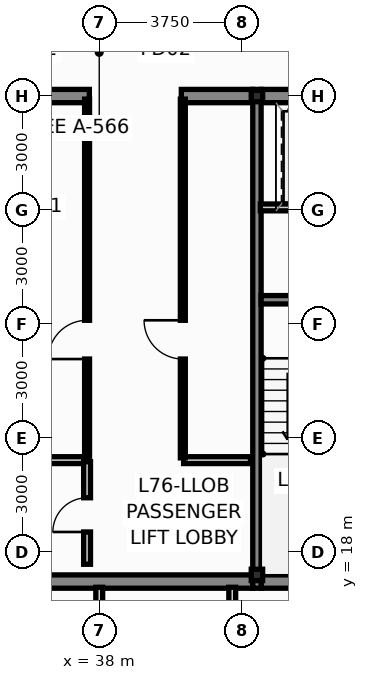
"""IFC4 building model, lengths in metres.
Left out: names, types, materials, properties, quantities, classifications, styles, units other than length and angle.
Written with IfcOpenShell. Run it as: python <this file> out.ifc"""

import sys

from ifc_helpers import new_model, si_unit, direction, frame, frame_2d, origin, origin_2d, place, context, subcontext, project, spatial, rectangle, hollow_rectangle, extrude, source, transform, mapped, element, fill, save


model = new_model("IFC4")
c1 = context("Model", 3, precision=1e-05, world=origin(), true_north=direction((0.0, 1.0)))
c2 = subcontext(c1, "Body", "Model", "MODEL_VIEW")
j1 = project(units=[si_unit("LENGTHUNIT", "METRE"), si_unit("PLANEANGLEUNIT", "RADIAN")], contexts=[c1])
p1 = place(None, origin())
s1 = spatial("IfcSite", under=j1, at=p1, CompositionType="ELEMENT")
p2 = place(p1, origin())
s2 = spatial("IfcBuilding", under=s1, at=p2, CompositionType="ELEMENT")
p3 = place(p2, frame((0.0, 0.0, 289.8)))
s3 = spatial("IfcBuildingStorey", under=s2, at=p3, CompositionType="ELEMENT", Elevation=289.8)
m1 = source(origin(), c2, "Body", "SweptSolid", [
    extrude(hollow_rectangle(XDim=0.3, YDim=0.3, WallThickness=0.012, at=origin_2d()), origin(), (0.0, 0.0, 1.0), 3.4),
])
for number, where, z_axis, x_axis in (
    (1, (42.15, 17.4, 0.0), (0.0, 0.0, 1.0), (1.0, 0.0, 0.0)),
    (2, (42.15, 30.0, 0.0), (0.0, 0.0, 1.0), (1.0, 0.0, 0.0)),
):
    element("IfcColumn", number, at=place(p3, frame(where, z_axis=z_axis, x_axis=x_axis)), inside=s3, PredefinedType="COLUMN", context=c2, shape_type="MappedRepresentation", body=[
        mapped(m1, transform((0.0, 0.0, 0.0), scale=1.0)),
    ])
p4 = place(p3, frame((33.96, 17.225, 0.0), z_axis=(0.0, 0.0, 1.0), x_axis=(1.0, 0.0, 0.0)))
e3 = element("IfcWall", 3, at=p4, inside=s3, PredefinedType="SHEAR", context=c2, shape_type="SweptSolid", body=[
    extrude(rectangle(XDim=8.08, YDim=0.35, at=frame_2d((4.04, 0.0))), origin(), (0.0, 0.0, 1.0), 3.4),
])
p5 = place(p3, frame((42.26, 17.225, 0.0), z_axis=(0.0, 0.0, 1.0), x_axis=(1.0, 0.0, 0.0)))
e4 = element("IfcWall", 4, at=p5, inside=s3, PredefinedType="SHEAR", context=c2, shape_type="SweptSolid", body=[
    extrude(rectangle(XDim=2.9, YDim=0.35, at=frame_2d((1.45, 0.0))), origin(), (0.0, 0.0, 1.0), 3.4),
])
p6 = place(p3, frame((33.96, 30.0, 0.0), z_axis=(0.0, 0.0, 1.0), x_axis=(1.0, 0.0, 0.0)))
e5 = element("IfcWall", 5, at=p6, inside=s3, PredefinedType="SHEAR", context=c2, shape_type="SweptSolid", body=[
    extrude(rectangle(XDim=3.78, YDim=0.35, at=frame_2d((1.89, 0.0))), origin(), (0.0, 0.0, 1.0), 3.4),
])
p7 = place(p3, frame((40.16, 30.0, 0.0), z_axis=(0.0, 0.0, 1.0), x_axis=(1.0, 0.0, 0.0)))
e6 = element("IfcWall", 6, at=p7, inside=s3, PredefinedType="SHEAR", context=c2, shape_type="SweptSolid", body=[
    extrude(rectangle(XDim=1.88, YDim=0.35, at=frame_2d((0.94, 0.0))), origin(), (0.0, 0.0, 1.0), 3.4),
])
p8 = place(p3, frame((42.26, 30.0, 0.0), z_axis=(0.0, 0.0, 1.0), x_axis=(1.0, 0.0, 0.0)))
e7 = element("IfcWall", 7, at=p8, inside=s3, PredefinedType="SHEAR", context=c2, shape_type="SweptSolid", body=[
    extrude(rectangle(XDim=2.9, YDim=0.35, at=frame_2d((1.45, 0.0))), origin(), (0.0, 0.0, 1.0), 3.4),
])
p9 = place(p3, frame((42.15, 17.05, 0.0), z_axis=(0.0, 0.0, 1.0), x_axis=(0.0, 1.0, 0.0)))
e8 = element("IfcWall", 8, at=p9, inside=s3, PredefinedType="SHEAR", context=c2, shape_type="SweptSolid", body=[
    extrude(rectangle(XDim=13.125, YDim=0.22, at=frame_2d((6.562, 0.0))), origin(), (0.0, 0.0, 1.0), 3.4),
])
p10 = place(p3, frame((42.26, 24.64, 0.0), z_axis=(0.0, 0.0, 1.0), x_axis=(1.0, 0.0, 0.0)))
e9 = element("IfcWall", 9, at=p10, inside=s3, PredefinedType="SHEAR", context=c2, shape_type="SweptSolid", body=[
    extrude(rectangle(XDim=2.9, YDim=0.22, at=frame_2d((1.45, 0.0))), origin(), (0.0, 0.0, 1.0), 3.4),
])
p11 = place(p3, frame((42.24, 27.07, 0.0), z_axis=(0.0, 0.0, 1.0), x_axis=(1.0, 0.0, 0.0)))
e10 = element("IfcWall", 10, at=p11, inside=s3, PredefinedType="PARTITIONING", context=c2, shape_type="SweptSolid", body=[
    extrude(rectangle(XDim=2.9, YDim=0.18, at=frame_2d((1.45, 0.0))), origin(), (0.0, 0.0, 1.0), 3.15),
])
p12 = place(p3, frame((34.02, 20.42, 0.0), z_axis=(0.0, 0.0, 1.0), x_axis=(1.0, 0.0, 0.0)))
e11 = element("IfcWall", 11, at=p12, inside=s3, PredefinedType="PARTITIONING", context=c2, shape_type="SweptSolid", body=[
    extrude(rectangle(XDim=3.64, YDim=0.18, at=frame_2d((1.82, 0.0))), origin(), (0.0, 0.0, 1.0), 3.15),
])
p13 = place(p3, frame((40.22, 20.42, 0.0), z_axis=(0.0, 0.0, 1.0), x_axis=(1.0, 0.0, 0.0)))
e12 = element("IfcWall", 12, at=p13, inside=s3, PredefinedType="PARTITIONING", context=c2, shape_type="SweptSolid", body=[
    extrude(rectangle(XDim=1.76, YDim=0.18, at=frame_2d((0.88, 0.0))), origin(), (0.0, 0.0, 1.0), 3.15),
])
p14 = place(p3, frame((37.68, 20.48, 0.0), z_axis=(0.0, 0.0, 1.0), x_axis=(0.0, 1.0, 0.0)))
e13 = element("IfcWall", 13, at=p14, inside=s3, PredefinedType="PARTITIONING", context=c2, shape_type="SweptSolid", body=[
    extrude(rectangle(XDim=9.44, YDim=0.13, at=frame_2d((4.72, 0.0))), origin(), (0.0, 0.0, 1.0), 3.15),
])
p15 = place(p14, frame((2.6, 0.0, 0.0)))
e14 = element("IfcOpeningElement", 14, at=p15, cuts=e13, PredefinedType="OPENING", context=c2, shape_type="SweptSolid", body=[
    extrude(rectangle(XDim=1.02, YDim=2.15, at=frame_2d((0.51, 1.075))), frame((0.0, 0.077, 0.0), z_axis=(0.0, -1.0, 0.0), x_axis=(1.0, 0.0, 0.0)), (0.0, 0.0, 1.0), 0.154),
])
p16 = place(p3, frame((40.2, 20.48, 0.0), z_axis=(0.0, 0.0, 1.0), x_axis=(0.0, 1.0, 0.0)))
e15 = element("IfcWall", 15, at=p16, inside=s3, PredefinedType="PARTITIONING", context=c2, shape_type="SweptSolid", body=[
    extrude(rectangle(XDim=9.44, YDim=0.13, at=frame_2d((4.72, 0.0))), origin(), (0.0, 0.0, 1.0), 3.15),
])
p17 = place(p16, frame((2.6, 0.0, 0.0)))
e16 = element("IfcOpeningElement", 16, at=p17, cuts=e15, PredefinedType="OPENING", context=c2, shape_type="SweptSolid", body=[
    extrude(rectangle(XDim=1.02, YDim=2.15, at=frame_2d((0.51, 1.075))), frame((0.0, 0.077, 0.0), z_axis=(0.0, -1.0, 0.0), x_axis=(1.0, 0.0, 0.0)), (0.0, 0.0, 1.0), 0.154),
])
p18 = place(p3, frame((37.68, 17.68, 0.0), z_axis=(0.0, 0.0, 1.0), x_axis=(0.0, 1.0, 0.0)))
e17 = element("IfcWall", 17, at=p18, inside=s3, PredefinedType="PARTITIONING", context=c2, shape_type="SweptSolid", body=[
    extrude(rectangle(XDim=2.7, YDim=0.18, at=frame_2d((1.35, 0.0))), origin(), (0.0, 0.0, 1.0), 3.15),
])
p19 = place(p18, frame((0.85, 0.0, 0.0)))
e18 = element("IfcOpeningElement", 18, at=p19, cuts=e17, PredefinedType="OPENING", context=c2, shape_type="SweptSolid", body=[
    extrude(rectangle(XDim=0.9, YDim=2.1, at=frame_2d((0.45, 1.05))), frame((0.0, 0.102, 0.0), z_axis=(0.0, -1.0, 0.0), x_axis=(1.0, 0.0, 0.0)), (0.0, 0.0, 1.0), 0.204),
])
p20 = place(p3, frame((38.0, 8.88, 0.0), z_axis=(0.0, 0.0, 1.0), x_axis=(0.0, 1.0, 0.0)))
e19 = element("IfcWall", 19, at=p20, inside=s3, PredefinedType="PARTITIONING", context=c2, shape_type="SweptSolid", body=[
    extrude(rectangle(XDim=8.195, YDim=0.18, at=frame_2d((4.098, 0.0))), origin(), (0.0, 0.0, 1.0), 3.15),
])
p21 = place(p20, frame((3.572, 0.0, 0.0)))
e20 = element("IfcOpeningElement", 20, at=p21, cuts=e19, PredefinedType="OPENING", context=c2, shape_type="SweptSolid", body=[
    extrude(rectangle(XDim=1.05, YDim=2.15, at=frame_2d((0.525, 1.075))), frame((0.0, 0.102, 0.0), z_axis=(0.0, -1.0, 0.0), x_axis=(1.0, 0.0, 0.0)), (0.0, 0.0, 1.0), 0.204),
])
p22 = place(p3, frame((41.5, 8.96, 0.0), z_axis=(0.0, 0.0, 1.0), x_axis=(0.0, 1.0, 0.0)))
e21 = element("IfcWall", 21, at=p22, inside=s3, PredefinedType="PARTITIONING", context=c2, shape_type="SweptSolid", body=[
    extrude(rectangle(XDim=8.115, YDim=0.18, at=frame_2d((4.058, 0.0))), origin(), (0.0, 0.0, 1.0), 3.15),
])
p23 = place(p15, origin())
e22 = element("IfcDoor", 22, at=p23, inside=s3, OperationType="SINGLE_SWING_LEFT", PredefinedType="DOOR", context=c2, shape_type="SweptSolid", body=[
    extrude(rectangle(XDim=1.02, YDim=2.15, at=frame_2d((0.51, 1.075))), frame((0.0, 0.025, 0.0), z_axis=(0.0, -1.0, 0.0), x_axis=(1.0, 0.0, 0.0)), (0.0, 0.0, 1.0), 0.05),
])
fill(e14, e22)
p24 = place(p17, origin())
e23 = element("IfcDoor", 23, at=p24, inside=s3, OperationType="SINGLE_SWING_RIGHT", PredefinedType="DOOR", context=c2, shape_type="SweptSolid", body=[
    extrude(rectangle(XDim=1.02, YDim=2.15, at=frame_2d((0.51, 1.075))), frame((0.0, 0.025, 0.0), z_axis=(0.0, -1.0, 0.0), x_axis=(1.0, 0.0, 0.0)), (0.0, 0.0, 1.0), 0.05),
])
fill(e16, e23)
p25 = place(p19, origin())
e24 = element("IfcDoor", 24, at=p25, inside=s3, OperationType="SINGLE_SWING_LEFT", PredefinedType="DOOR", context=c2, shape_type="SweptSolid", body=[
    extrude(rectangle(XDim=0.9, YDim=2.1, at=frame_2d((0.45, 1.05))), frame((0.0, 0.025, 0.0), z_axis=(0.0, -1.0, 0.0), x_axis=(1.0, 0.0, 0.0)), (0.0, 0.0, 1.0), 0.05),
])
fill(e18, e24)
save(model, sys.argv[1])
